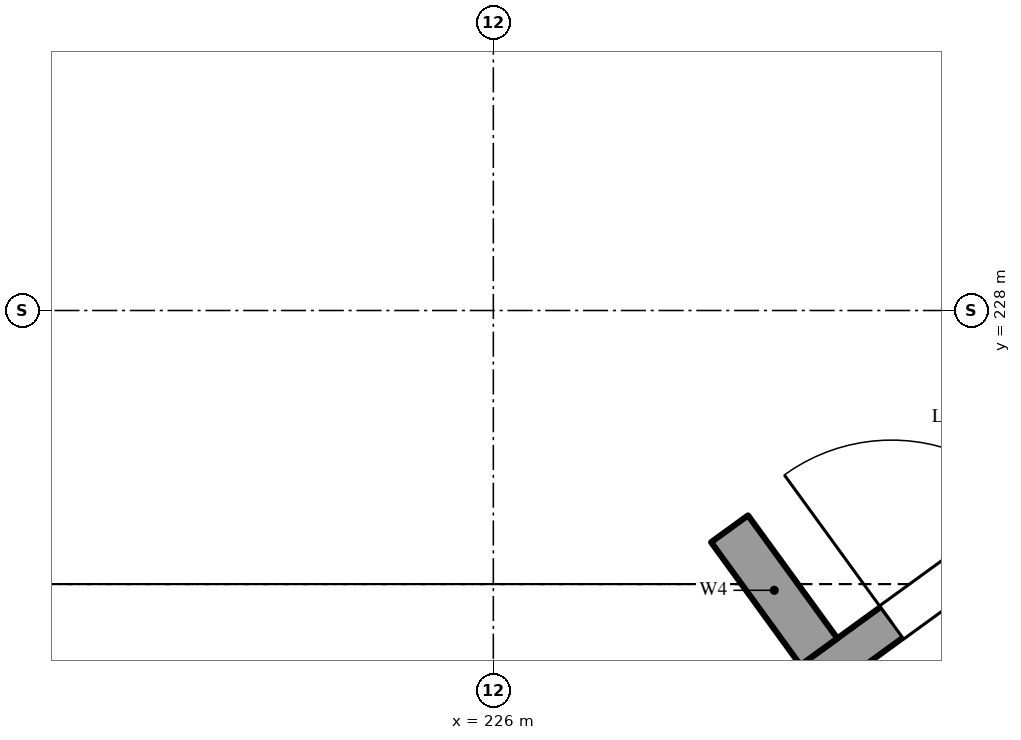
"""IFC4 building model, lengths in metres.
Left out: names, types, materials, properties, quantities, classifications, styles, units other than length and angle.
Written with IfcOpenShell. Run it as: python <this file> out.ifc"""

import sys

from ifc_helpers import new_model, si_unit, direction, frame, frame_2d, origin, place, context, subcontext, project, spatial, rectangle, extrude, element, fill, save


model = new_model("IFC4")
c1 = context("Model", 3, precision=1e-05, world=origin(), true_north=direction((0.0, 1.0)))
c2 = subcontext(c1, "Body", "Model", "MODEL_VIEW")
j1 = project(units=[si_unit("LENGTHUNIT", "METRE"), si_unit("PLANEANGLEUNIT", "RADIAN")], contexts=[c1])
p1 = place(None, origin())
s1 = spatial("IfcSite", under=j1, at=p1, CompositionType="ELEMENT")
p2 = place(p1, origin())
s2 = spatial("IfcBuilding", under=s1, at=p2, CompositionType="ELEMENT")
p3 = place(p2, origin())
s3 = spatial("IfcBuildingStorey", under=s2, at=p3, CompositionType="ELEMENT", Elevation=0.0)
p4 = place(p3, frame((197.908, 199.678, -0.3), z_axis=(0.0, 0.0, 1.0), x_axis=(0.809017930405, 0.587783963956, 0.0)))
e1 = element("IfcWall", 1, at=p4, inside=s3, PredefinedType="SOLIDWALL", context=c2, shape_type="SweptSolid", body=[
    extrude(rectangle(XDim=60.4, YDim=0.5, at=frame_2d((30.2, 0.0))), origin(), (0.0, 0.0, 1.0), 7.5),
])
p5 = place(p4, frame((41.2, 0.0, 0.3)))
e2 = element("IfcOpeningElement", 2, at=p5, cuts=e1, PredefinedType="OPENING", context=c2, shape_type="SweptSolid", body=[
    extrude(rectangle(XDim=2.4, YDim=2.4, at=frame_2d((1.2, 1.2))), frame((0.0, 0.26, 0.0), z_axis=(0.0, -1.0, 0.0), x_axis=(1.0, 0.0, 0.0)), (0.0, 0.0, 1.0), 0.52),
])
p6 = place(p4, frame((33.2, 0.0, 0.3)))
e3 = element("IfcOpeningElement", 3, at=p6, cuts=e1, PredefinedType="OPENING", context=c2, shape_type="SweptSolid", body=[
    extrude(rectangle(XDim=2.4, YDim=2.4, at=frame_2d((1.2, 1.2))), frame((0.0, 0.26, 0.0), z_axis=(0.0, -1.0, 0.0), x_axis=(1.0, 0.0, 0.0)), (0.0, 0.0, 1.0), 0.52),
])
p7 = place(p4, frame((0.5, 0.0, 0.3)))
e4 = element("IfcOpeningElement", 4, at=p7, cuts=e1, PredefinedType="OPENING", context=c2, shape_type="SweptSolid", body=[
    extrude(rectangle(XDim=2.1, YDim=2.1, at=frame_2d((1.05, 1.05))), frame((0.0, 0.26, 0.0), z_axis=(0.0, -1.0, 0.0), x_axis=(1.0, 0.0, 0.0)), (0.0, 0.0, 1.0), 0.52),
])
p8 = place(p4, frame((15.6, 0.0, 0.3)))
e5 = element("IfcOpeningElement", 5, at=p8, cuts=e1, PredefinedType="OPENING", context=c2, shape_type="SweptSolid", body=[
    extrude(rectangle(XDim=2.1, YDim=2.1, at=frame_2d((1.05, 1.05))), frame((0.0, 0.26, 0.0), z_axis=(0.0, -1.0, 0.0), x_axis=(1.0, 0.0, 0.0)), (0.0, 0.0, 1.0), 0.52),
])
p9 = place(p4, frame((50.75, 0.0, 2.4)))
e6 = element("IfcOpeningElement", 6, at=p9, cuts=e1, PredefinedType="OPENING", context=c2, shape_type="SweptSolid", body=[
    extrude(rectangle(XDim=1.2, YDim=1.2, at=frame_2d((0.6, 0.6))), frame((0.0, 0.26, 0.0), z_axis=(0.0, -1.0, 0.0), x_axis=(1.0, 0.0, 0.0)), (0.0, 0.0, 1.0), 0.52),
])
p10 = place(p4, frame((53.45, 0.0, 2.4)))
e7 = element("IfcOpeningElement", 7, at=p10, cuts=e1, PredefinedType="OPENING", context=c2, shape_type="SweptSolid", body=[
    extrude(rectangle(XDim=1.5, YDim=1.2, at=frame_2d((0.75, 0.6))), frame((0.0, 0.26, 0.0), z_axis=(0.0, -1.0, 0.0), x_axis=(1.0, 0.0, 0.0)), (0.0, 0.0, 1.0), 0.52),
])
p11 = place(p4, frame((57.35, 0.0, 2.4)))
e8 = element("IfcOpeningElement", 8, at=p11, cuts=e1, PredefinedType="OPENING", context=c2, shape_type="SweptSolid", body=[
    extrude(rectangle(XDim=1.5, YDim=1.2, at=frame_2d((0.75, 0.6))), frame((0.0, 0.26, 0.0), z_axis=(0.0, -1.0, 0.0), x_axis=(1.0, 0.0, 0.0)), (0.0, 0.0, 1.0), 0.52),
])
p12 = place(p3, frame((230.284, 223.51, -0.3), z_axis=(0.0, 0.0, 1.0), x_axis=(-0.587881334972, 0.808947177504, 0.0)))
e9 = element("IfcWall", 9, at=p12, inside=s3, PredefinedType="SOLIDWALL", context=c2, shape_type="SweptSolid", body=[
    extrude(rectangle(XDim=2.0, YDim=0.6, at=frame_2d((1.0, 0.0))), origin(), (0.0, 0.0, 1.0), 7.5),
])
p13 = place(p5, origin())
e10 = element("IfcDoor", 10, at=p13, inside=s3, OperationType="DOUBLE_DOOR_SINGLE_SWING", PredefinedType="DOOR", context=c2, shape_type="SweptSolid", body=[
    extrude(rectangle(XDim=2.4, YDim=2.4, at=frame_2d((1.2, 1.2))), frame((0.0, 0.025, 0.0), z_axis=(0.0, -1.0, 0.0), x_axis=(1.0, 0.0, 0.0)), (0.0, 0.0, 1.0), 0.05),
])
fill(e2, e10)
save(model, sys.argv[1])
